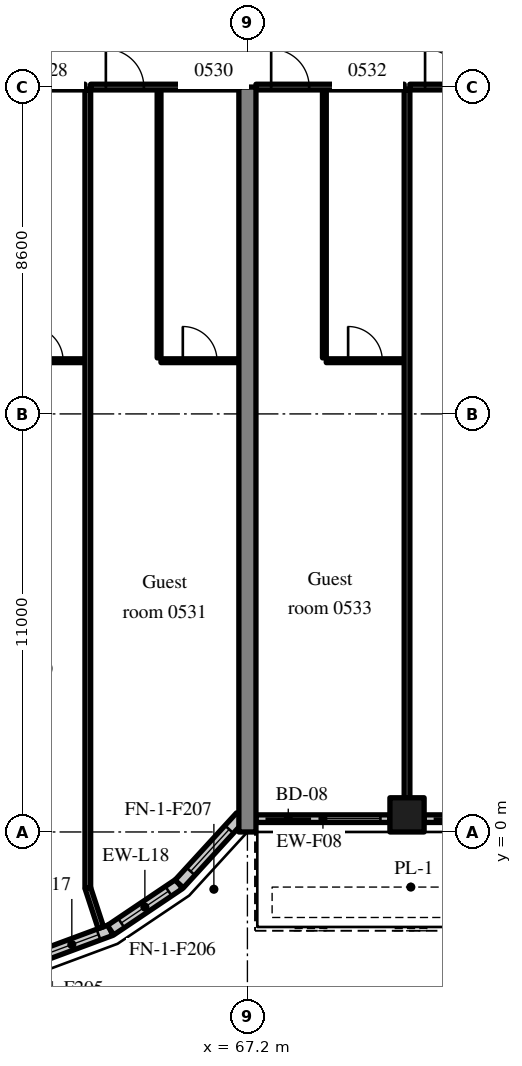
"""IFC4 building model, lengths in metres.
Left out: names, types, materials, properties, quantities, classifications, styles, units other than length and angle.
Written with IfcOpenShell. Run it as: python <this file> out.ifc"""

import sys

from ifc_helpers import new_model, si_unit, direction, frame, frame_2d, origin, origin_2d, place, context, subcontext, project, spatial, rectangle, extrude, source, transform, mapped, element, fill, save


model = new_model("IFC4")
c1 = context("Model", 3, precision=1e-05, world=origin(), true_north=direction((0.0, 1.0)))
c2 = subcontext(c1, "Body", "Model", "MODEL_VIEW")
j1 = project(units=[si_unit("LENGTHUNIT", "METRE"), si_unit("PLANEANGLEUNIT", "RADIAN")], contexts=[c1])
p1 = place(None, origin())
s1 = spatial("IfcSite", under=j1, at=p1, CompositionType="ELEMENT")
p2 = place(p1, origin())
s2 = spatial("IfcBuilding", under=s1, at=p2, CompositionType="ELEMENT")
p3 = place(p2, frame((0.0, 0.0, 27.8)))
s3 = spatial("IfcBuildingStorey", under=s2, at=p3, CompositionType="ELEMENT", Elevation=27.8)
m1 = source(origin(), c2, "Body", "SweptSolid", [
    extrude(rectangle(XDim=19.6, YDim=0.45, at=frame_2d((9.8, 0.0))), origin(), (0.0, 0.0, 1.0), 3.52),
])
p4 = place(p3, frame((67.2, 0.0, 0.0), z_axis=(0.0, 0.0, 1.0), x_axis=(0.0, 1.0, 0.0)))
e1 = element("IfcWall", 1, at=p4, inside=s3, PredefinedType="SHEAR", context=c2, shape_type="MappedRepresentation", body=[
    mapped(m1, transform((0.0, 0.0, 0.0), scale=1.0)),
])
m2 = source(origin(), c2, "Body", "SweptSolid", [
    extrude(rectangle(XDim=0.9, YDim=0.9, at=origin_2d()), origin(), (0.0, 0.0, 1.0), 3.52),
])
p5 = place(p3, frame((71.4, 0.45, 0.0), z_axis=(0.0, 0.0, 1.0), x_axis=(1.0, 0.0, 0.0)))
e2 = element("IfcColumn", 2, at=p5, inside=s3, PredefinedType="COLUMN", context=c2, shape_type="MappedRepresentation", body=[
    mapped(m2, transform((0.0, 0.0, 0.0), scale=1.0)),
])
m3 = source(origin(), c2, "Body", "SweptSolid", [
    extrude(rectangle(XDim=2.176, YDim=0.3, at=frame_2d((1.088, 0.0))), origin(), (0.0, 0.0, 1.0), 3.52),
])
p6 = place(p3, frame((61.56, -3.34, 0.0), z_axis=(0.0, 0.0, 1.0), x_axis=(0.937531979054, 0.347899106424, 0.0)))
e3 = element("IfcWall", 3, at=p6, inside=s3, PredefinedType="SOLIDWALL", context=c2, shape_type="MappedRepresentation", body=[
    mapped(m3, transform((0.0, 0.0, 0.0), scale=1.0)),
])
m4 = source(origin(), c2, "Body", "SweptSolid", [
    extrude(rectangle(XDim=1.5, YDim=2.0, at=frame_2d((0.75, 1.0))), frame((0.0, 0.16, 0.0), z_axis=(0.0, -1.0, 0.0), x_axis=(1.0, 0.0, 0.0)), (0.0, 0.0, 1.0), 0.32),
])
p7 = place(p6, frame((0.338, 0.0, 0.9)))
e4 = element("IfcOpeningElement", 4, at=p7, cuts=e3, PredefinedType="OPENING", context=c2, shape_type="MappedRepresentation", body=[
    mapped(m4, transform((0.0, 0.0, 0.0), scale=1.0)),
])
m5 = source(origin(), c2, "Body", "SweptSolid", [
    extrude(rectangle(XDim=2.176, YDim=0.3, at=frame_2d((1.088, 0.0))), origin(), (0.0, 0.0, 1.0), 3.52),
])
p8 = place(p3, frame((63.599, -2.583, 0.0), z_axis=(0.0, 0.0, 1.0), x_axis=(0.829625727223, 0.558319937607, 0.0)))
e5 = element("IfcWall", 5, at=p8, inside=s3, PredefinedType="SOLIDWALL", context=c2, shape_type="MappedRepresentation", body=[
    mapped(m5, transform((0.0, 0.0, 0.0), scale=1.0)),
])
p9 = place(p8, frame((0.338, 0.0, 0.9)))
e6 = element("IfcOpeningElement", 6, at=p9, cuts=e5, PredefinedType="OPENING", context=c2, shape_type="MappedRepresentation", body=[
    mapped(m4, transform((0.0, 0.0, 0.0), scale=1.0)),
])
m6 = source(origin(), c2, "Body", "SweptSolid", [
    extrude(rectangle(XDim=2.398, YDim=0.3, at=frame_2d((1.199, 0.0))), origin(), (0.0, 0.0, 1.0), 3.52),
])
p10 = place(p3, frame((65.404, -1.369, 0.0), z_axis=(0.0, 0.0, 1.0), x_axis=(0.675374189419, 0.737475222815, 0.0)))
e7 = element("IfcWall", 7, at=p10, inside=s3, PredefinedType="SOLIDWALL", context=c2, shape_type="MappedRepresentation", body=[
    mapped(m6, transform((0.0, 0.0, 0.0), scale=1.0)),
])
p11 = place(p10, frame((0.449, 0.0, 0.9)))
e8 = element("IfcOpeningElement", 8, at=p11, cuts=e7, PredefinedType="OPENING", context=c2, shape_type="MappedRepresentation", body=[
    mapped(m4, transform((0.0, 0.0, 0.0), scale=1.0)),
])
m7 = source(origin(), c2, "Body", "SweptSolid", [
    extrude(rectangle(XDim=3.525, YDim=0.2, at=frame_2d((1.762, 0.0))), origin(), (0.0, 0.0, 1.0), 2.77),
])
p12 = place(p3, frame((67.425, 0.35, 0.0), z_axis=(0.0, 0.0, 1.0), x_axis=(1.0, 0.0, 0.0)))
e9 = element("IfcWall", 9, at=p12, inside=s3, PredefinedType="SOLIDWALL", context=c2, shape_type="MappedRepresentation", body=[
    mapped(m7, transform((0.0, 0.0, 0.0), scale=1.0)),
])
m8 = source(origin(), c2, "Body", "SweptSolid", [
    extrude(rectangle(XDim=1.2, YDim=2.4, at=frame_2d((0.6, 1.2))), frame((0.0, 0.11, 0.0), z_axis=(0.0, -1.0, 0.0), x_axis=(1.0, 0.0, 0.0)), (0.0, 0.0, 1.0), 0.22),
])
p13 = place(p12, frame((0.25, 0.0, 0.0)))
e10 = element("IfcOpeningElement", 10, at=p13, cuts=e9, PredefinedType="OPENING", context=c2, shape_type="MappedRepresentation", body=[
    mapped(m8, transform((0.0, 0.0, 0.0), scale=1.0)),
])
m9 = source(origin(), c2, "Body", "SweptSolid", [
    extrude(rectangle(XDim=1.5, YDim=1.5, at=frame_2d((0.75, 0.75))), frame((0.0, 0.11, 0.0), z_axis=(0.0, -1.0, 0.0), x_axis=(1.0, 0.0, 0.0)), (0.0, 0.0, 1.0), 0.22),
])
p14 = place(p12, frame((1.775, 0.0, 0.9)))
e11 = element("IfcOpeningElement", 11, at=p14, cuts=e9, PredefinedType="OPENING", context=c2, shape_type="MappedRepresentation", body=[
    mapped(m9, transform((0.0, 0.0, 0.0), scale=1.0)),
])
p15 = place(p3, frame((71.85, 0.35, 0.0), z_axis=(0.0, 0.0, 1.0), x_axis=(1.0, 0.0, 0.0)))
e12 = element("IfcWall", 12, at=p15, inside=s3, PredefinedType="SOLIDWALL", context=c2, shape_type="MappedRepresentation", body=[
    mapped(m7, transform((0.0, 0.0, 0.0), scale=1.0)),
])
p16 = place(p15, frame((0.25, 0.0, 0.0)))
e13 = element("IfcOpeningElement", 13, at=p16, cuts=e12, PredefinedType="OPENING", context=c2, shape_type="MappedRepresentation", body=[
    mapped(m8, transform((0.0, 0.0, 0.0), scale=1.0)),
])
p17 = place(p15, frame((1.775, 0.0, 0.9)))
e14 = element("IfcOpeningElement", 14, at=p17, cuts=e12, PredefinedType="OPENING", context=c2, shape_type="MappedRepresentation", body=[
    mapped(m9, transform((0.0, 0.0, 0.0), scale=1.0)),
])
m10 = source(origin(), c2, "Body", "SweptSolid", [
    extrude(rectangle(XDim=2.05, YDim=0.1, at=frame_2d((1.025, 0.0))), origin(), (0.0, 0.0, 1.0), 3.52),
])
p18 = place(p3, frame((60.875, 12.4, 0.0), z_axis=(0.0, 0.0, 1.0), x_axis=(1.0, 0.0, 0.0)))
e15 = element("IfcWall", 15, at=p18, inside=s3, PredefinedType="PARTITIONING", context=c2, shape_type="MappedRepresentation", body=[
    mapped(m10, transform((0.0, 0.0, 0.0), scale=1.0)),
])
m11 = source(origin(), c2, "Body", "SweptSolid", [
    extrude(rectangle(XDim=0.9, YDim=2.1, at=frame_2d((0.45, 1.05))), frame((0.0, 0.06, 0.0), z_axis=(0.0, -1.0, 0.0), x_axis=(1.0, 0.0, 0.0)), (0.0, 0.0, 1.0), 0.12),
])
p19 = place(p18, frame((0.575, 0.0, 0.0)))
e16 = element("IfcOpeningElement", 16, at=p19, cuts=e15, PredefinedType="OPENING", context=c2, shape_type="MappedRepresentation", body=[
    mapped(m11, transform((0.0, 0.0, 0.0), scale=1.0)),
])
m12 = source(origin(), c2, "Body", "SweptSolid", [
    extrude(rectangle(XDim=3.9, YDim=0.15, at=frame_2d((1.95, 0.0))), origin(), (0.0, 0.0, 1.0), 2.82),
])
p20 = place(p3, frame((59.025, 19.6, 0.0), z_axis=(0.0, 0.0, 1.0), x_axis=(1.0, 0.0, 0.0)))
e17 = element("IfcWall", 17, at=p20, inside=s3, PredefinedType="PARTITIONING", context=c2, shape_type="MappedRepresentation", body=[
    mapped(m12, transform((0.0, 0.0, 0.0), scale=1.0)),
])
m13 = source(origin(), c2, "Body", "SweptSolid", [
    extrude(rectangle(XDim=1.0, YDim=2.1, at=frame_2d((0.5, 1.05))), frame((0.0, 0.085, 0.0), z_axis=(0.0, -1.0, 0.0), x_axis=(1.0, 0.0, 0.0)), (0.0, 0.0, 1.0), 0.17),
])
p21 = place(p20, frame((0.4, 0.0, 0.0)))
e18 = element("IfcOpeningElement", 18, at=p21, cuts=e17, PredefinedType="OPENING", context=c2, shape_type="MappedRepresentation", body=[
    mapped(m13, transform((0.0, 0.0, 0.0), scale=1.0)),
])
m14 = source(origin(), c2, "Body", "SweptSolid", [
    extrude(rectangle(XDim=7.05, YDim=0.1, at=frame_2d((3.525, 0.0))), origin(), (0.0, 0.0, 1.0), 3.52),
])
p22 = place(p3, frame((64.875, 12.475, 0.0), z_axis=(0.0, 0.0, 1.0), x_axis=(0.0, 1.0, 0.0)))
e19 = element("IfcWall", 19, at=p22, inside=s3, PredefinedType="PARTITIONING", context=c2, shape_type="MappedRepresentation", body=[
    mapped(m14, transform((0.0, 0.0, 0.0), scale=1.0)),
])
p23 = place(p3, frame((64.925, 12.4, 0.0), z_axis=(0.0, 0.0, 1.0), x_axis=(1.0, 0.0, 0.0)))
e20 = element("IfcWall", 20, at=p23, inside=s3, PredefinedType="PARTITIONING", context=c2, shape_type="MappedRepresentation", body=[
    mapped(m10, transform((0.0, 0.0, 0.0), scale=1.0)),
])
p24 = place(p23, frame((0.575, 0.0, 0.0)))
e21 = element("IfcOpeningElement", 21, at=p24, cuts=e20, PredefinedType="OPENING", context=c2, shape_type="MappedRepresentation", body=[
    mapped(m11, transform((0.0, 0.0, 0.0), scale=1.0)),
])
p25 = place(p3, frame((63.075, 19.6, 0.0), z_axis=(0.0, 0.0, 1.0), x_axis=(1.0, 0.0, 0.0)))
e22 = element("IfcWall", 22, at=p25, inside=s3, PredefinedType="PARTITIONING", context=c2, shape_type="MappedRepresentation", body=[
    mapped(m12, transform((0.0, 0.0, 0.0), scale=1.0)),
])
p26 = place(p25, frame((0.4, 0.0, 0.0)))
e23 = element("IfcOpeningElement", 23, at=p26, cuts=e22, PredefinedType="OPENING", context=c2, shape_type="MappedRepresentation", body=[
    mapped(m13, transform((0.0, 0.0, 0.0), scale=1.0)),
])
m15 = source(origin(), c2, "Body", "SweptSolid", [
    extrude(rectangle(XDim=20.998, YDim=0.15, at=frame_2d((10.499, 0.0))), origin(), (0.0, 0.0, 1.0), 3.52),
])
p27 = place(p3, frame((63.0, -1.473, 0.0), z_axis=(0.0, 0.0, 1.0), x_axis=(0.0, 1.0, 0.0)))
e24 = element("IfcWall", 24, at=p27, inside=s3, PredefinedType="PARTITIONING", context=c2, shape_type="MappedRepresentation", body=[
    mapped(m15, transform((0.0, 0.0, 0.0), scale=1.0)),
])
p28 = place(p3, frame((69.225, 12.475, 0.0), z_axis=(0.0, 0.0, 1.0), x_axis=(0.0, 1.0, 0.0)))
e25 = element("IfcWall", 25, at=p28, inside=s3, PredefinedType="PARTITIONING", context=c2, shape_type="MappedRepresentation", body=[
    mapped(m14, transform((0.0, 0.0, 0.0), scale=1.0)),
])
p29 = place(p3, frame((69.275, 12.4, 0.0), z_axis=(0.0, 0.0, 1.0), x_axis=(1.0, 0.0, 0.0)))
e26 = element("IfcWall", 26, at=p29, inside=s3, PredefinedType="PARTITIONING", context=c2, shape_type="MappedRepresentation", body=[
    mapped(m10, transform((0.0, 0.0, 0.0), scale=1.0)),
])
p30 = place(p29, frame((0.575, 0.0, 0.0)))
e27 = element("IfcOpeningElement", 27, at=p30, cuts=e26, PredefinedType="OPENING", context=c2, shape_type="MappedRepresentation", body=[
    mapped(m11, transform((0.0, 0.0, 0.0), scale=1.0)),
])
m16 = source(origin(), c2, "Body", "SweptSolid", [
    extrude(rectangle(XDim=3.9, YDim=0.15, at=frame_2d((1.95, 0.0))), origin(), (0.0, 0.0, 1.0), 2.82),
])
p31 = place(p3, frame((67.425, 19.6, 0.0), z_axis=(0.0, 0.0, 1.0), x_axis=(1.0, 0.0, 0.0)))
e28 = element("IfcWall", 28, at=p31, inside=s3, PredefinedType="PARTITIONING", context=c2, shape_type="MappedRepresentation", body=[
    mapped(m16, transform((0.0, 0.0, 0.0), scale=1.0)),
])
p32 = place(p31, frame((0.4, 0.0, 0.0)))
e29 = element("IfcOpeningElement", 29, at=p32, cuts=e28, PredefinedType="OPENING", context=c2, shape_type="MappedRepresentation", body=[
    mapped(m13, transform((0.0, 0.0, 0.0), scale=1.0)),
])
p33 = place(p3, frame((71.475, 19.6, 0.0), z_axis=(0.0, 0.0, 1.0), x_axis=(1.0, 0.0, 0.0)))
e30 = element("IfcWall", 30, at=p33, inside=s3, PredefinedType="PARTITIONING", context=c2, shape_type="MappedRepresentation", body=[
    mapped(m16, transform((0.0, 0.0, 0.0), scale=1.0)),
])
p34 = place(p33, frame((0.4, 0.0, 0.0)))
e31 = element("IfcOpeningElement", 31, at=p34, cuts=e30, PredefinedType="OPENING", context=c2, shape_type="MappedRepresentation", body=[
    mapped(m13, transform((0.0, 0.0, 0.0), scale=1.0)),
])
m17 = source(origin(), c2, "Body", "SweptSolid", [
    extrude(rectangle(XDim=18.625, YDim=0.15, at=frame_2d((9.312, 0.0))), origin(), (0.0, 0.0, 1.0), 3.52),
])
p35 = place(p3, frame((71.4, 0.9, 0.0), z_axis=(0.0, 0.0, 1.0), x_axis=(0.0, 1.0, 0.0)))
e32 = element("IfcWall", 32, at=p35, inside=s3, PredefinedType="PARTITIONING", context=c2, shape_type="MappedRepresentation", body=[
    mapped(m17, transform((0.0, 0.0, 0.0), scale=1.0)),
])
m18 = source(origin(), c2, "Body", "SweptSolid", [
    extrude(rectangle(XDim=1.101, YDim=0.15, at=frame_2d((0.55, 0.0))), origin(), (0.0, 0.0, 1.0), 3.52),
])
p36 = place(p3, frame((63.343, -2.519, 0.0), z_axis=(0.0, 0.0, 1.0), x_axis=(-0.311567081539, 0.950224159712, 0.0)))
e33 = element("IfcWall", 33, at=p36, inside=s3, PredefinedType="PARTITIONING", context=c2, shape_type="MappedRepresentation", body=[
    mapped(m18, transform((0.0, 0.0, 0.0), scale=1.0)),
])
m19 = source(origin(), c2, "Body", "SweptSolid", [
    extrude(rectangle(XDim=1.5, YDim=2.0, at=frame_2d((0.75, 1.0))), frame((0.0, 0.03, 0.0), z_axis=(0.0, -1.0, 0.0), x_axis=(1.0, 0.0, 0.0)), (0.0, 0.0, 1.0), 0.06),
])
p37 = place(p7, origin())
e34 = element("IfcWindow", 34, at=p37, inside=s3, PartitioningType="SINGLE_PANEL", PredefinedType="WINDOW", context=c2, shape_type="MappedRepresentation", body=[
    mapped(m19, transform((0.0, 0.0, 0.0), scale=1.0)),
])
fill(e4, e34)
p38 = place(p9, origin())
e35 = element("IfcWindow", 35, at=p38, inside=s3, PartitioningType="SINGLE_PANEL", PredefinedType="WINDOW", context=c2, shape_type="MappedRepresentation", body=[
    mapped(m19, transform((0.0, 0.0, 0.0), scale=1.0)),
])
fill(e6, e35)
p39 = place(p11, origin())
e36 = element("IfcWindow", 36, at=p39, inside=s3, PartitioningType="SINGLE_PANEL", PredefinedType="WINDOW", context=c2, shape_type="MappedRepresentation", body=[
    mapped(m19, transform((0.0, 0.0, 0.0), scale=1.0)),
])
fill(e8, e36)
m20 = source(origin(), c2, "Body", "SweptSolid", [
    extrude(rectangle(XDim=1.2, YDim=2.4, at=frame_2d((0.6, 1.2))), frame((0.0, 0.025, 0.0), z_axis=(0.0, -1.0, 0.0), x_axis=(1.0, 0.0, 0.0)), (0.0, 0.0, 1.0), 0.05),
])
p40 = place(p13, origin())
e37 = element("IfcDoor", 37, at=p40, inside=s3, OperationType="SLIDING_TO_RIGHT", PredefinedType="DOOR", context=c2, shape_type="MappedRepresentation", body=[
    mapped(m20, transform((0.0, 0.0, 0.0), scale=1.0)),
])
fill(e10, e37)
m21 = source(origin(), c2, "Body", "SweptSolid", [
    extrude(rectangle(XDim=1.5, YDim=1.5, at=frame_2d((0.75, 0.75))), frame((0.0, 0.03, 0.0), z_axis=(0.0, -1.0, 0.0), x_axis=(1.0, 0.0, 0.0)), (0.0, 0.0, 1.0), 0.06),
])
p41 = place(p14, origin())
e38 = element("IfcWindow", 38, at=p41, inside=s3, PartitioningType="SINGLE_PANEL", PredefinedType="WINDOW", context=c2, shape_type="MappedRepresentation", body=[
    mapped(m21, transform((0.0, 0.0, 0.0), scale=1.0)),
])
fill(e11, e38)
p42 = place(p16, origin())
e39 = element("IfcDoor", 39, at=p42, inside=s3, OperationType="SLIDING_TO_LEFT", PredefinedType="DOOR", context=c2, shape_type="MappedRepresentation", body=[
    mapped(m20, transform((0.0, 0.0, 0.0), scale=1.0)),
])
fill(e13, e39)
m22 = source(origin(), c2, "Body", "SweptSolid", [
    extrude(rectangle(XDim=0.9, YDim=2.1, at=frame_2d((0.45, 1.05))), frame((0.0, 0.025, 0.0), z_axis=(0.0, -1.0, 0.0), x_axis=(1.0, 0.0, 0.0)), (0.0, 0.0, 1.0), 0.05),
])
p43 = place(p19, origin())
e40 = element("IfcDoor", 40, at=p43, inside=s3, OperationType="SINGLE_SWING_LEFT", PredefinedType="DOOR", context=c2, shape_type="MappedRepresentation", body=[
    mapped(m22, transform((0.0, 0.0, 0.0), scale=1.0)),
])
fill(e16, e40)
p44 = place(p24, origin())
e41 = element("IfcDoor", 41, at=p44, inside=s3, OperationType="SINGLE_SWING_LEFT", PredefinedType="DOOR", context=c2, shape_type="MappedRepresentation", body=[
    mapped(m22, transform((0.0, 0.0, 0.0), scale=1.0)),
])
fill(e21, e41)
m23 = source(origin(), c2, "Body", "SweptSolid", [
    extrude(rectangle(XDim=1.0, YDim=2.1, at=frame_2d((0.5, 1.05))), frame((0.0, 0.025, 0.0), z_axis=(0.0, -1.0, 0.0), x_axis=(1.0, 0.0, 0.0)), (0.0, 0.0, 1.0), 0.05),
])
p45 = place(p26, origin())
e42 = element("IfcDoor", 42, at=p45, inside=s3, OperationType="SINGLE_SWING_LEFT", PredefinedType="DOOR", context=c2, shape_type="MappedRepresentation", body=[
    mapped(m23, transform((0.0, 0.0, 0.0), scale=1.0)),
])
fill(e23, e42)
p46 = place(p30, origin())
e43 = element("IfcDoor", 43, at=p46, inside=s3, OperationType="SINGLE_SWING_LEFT", PredefinedType="DOOR", context=c2, shape_type="MappedRepresentation", body=[
    mapped(m22, transform((0.0, 0.0, 0.0), scale=1.0)),
])
fill(e27, e43)
p47 = place(p32, origin())
e44 = element("IfcDoor", 44, at=p47, inside=s3, OperationType="SINGLE_SWING_LEFT", PredefinedType="DOOR", context=c2, shape_type="MappedRepresentation", body=[
    mapped(m23, transform((0.0, 0.0, 0.0), scale=1.0)),
])
fill(e29, e44)
p48 = place(p34, origin())
e45 = element("IfcDoor", 45, at=p48, inside=s3, OperationType="SINGLE_SWING_LEFT", PredefinedType="DOOR", context=c2, shape_type="MappedRepresentation", body=[
    mapped(m23, transform((0.0, 0.0, 0.0), scale=1.0)),
])
fill(e31, e45)
save(model, sys.argv[1])
